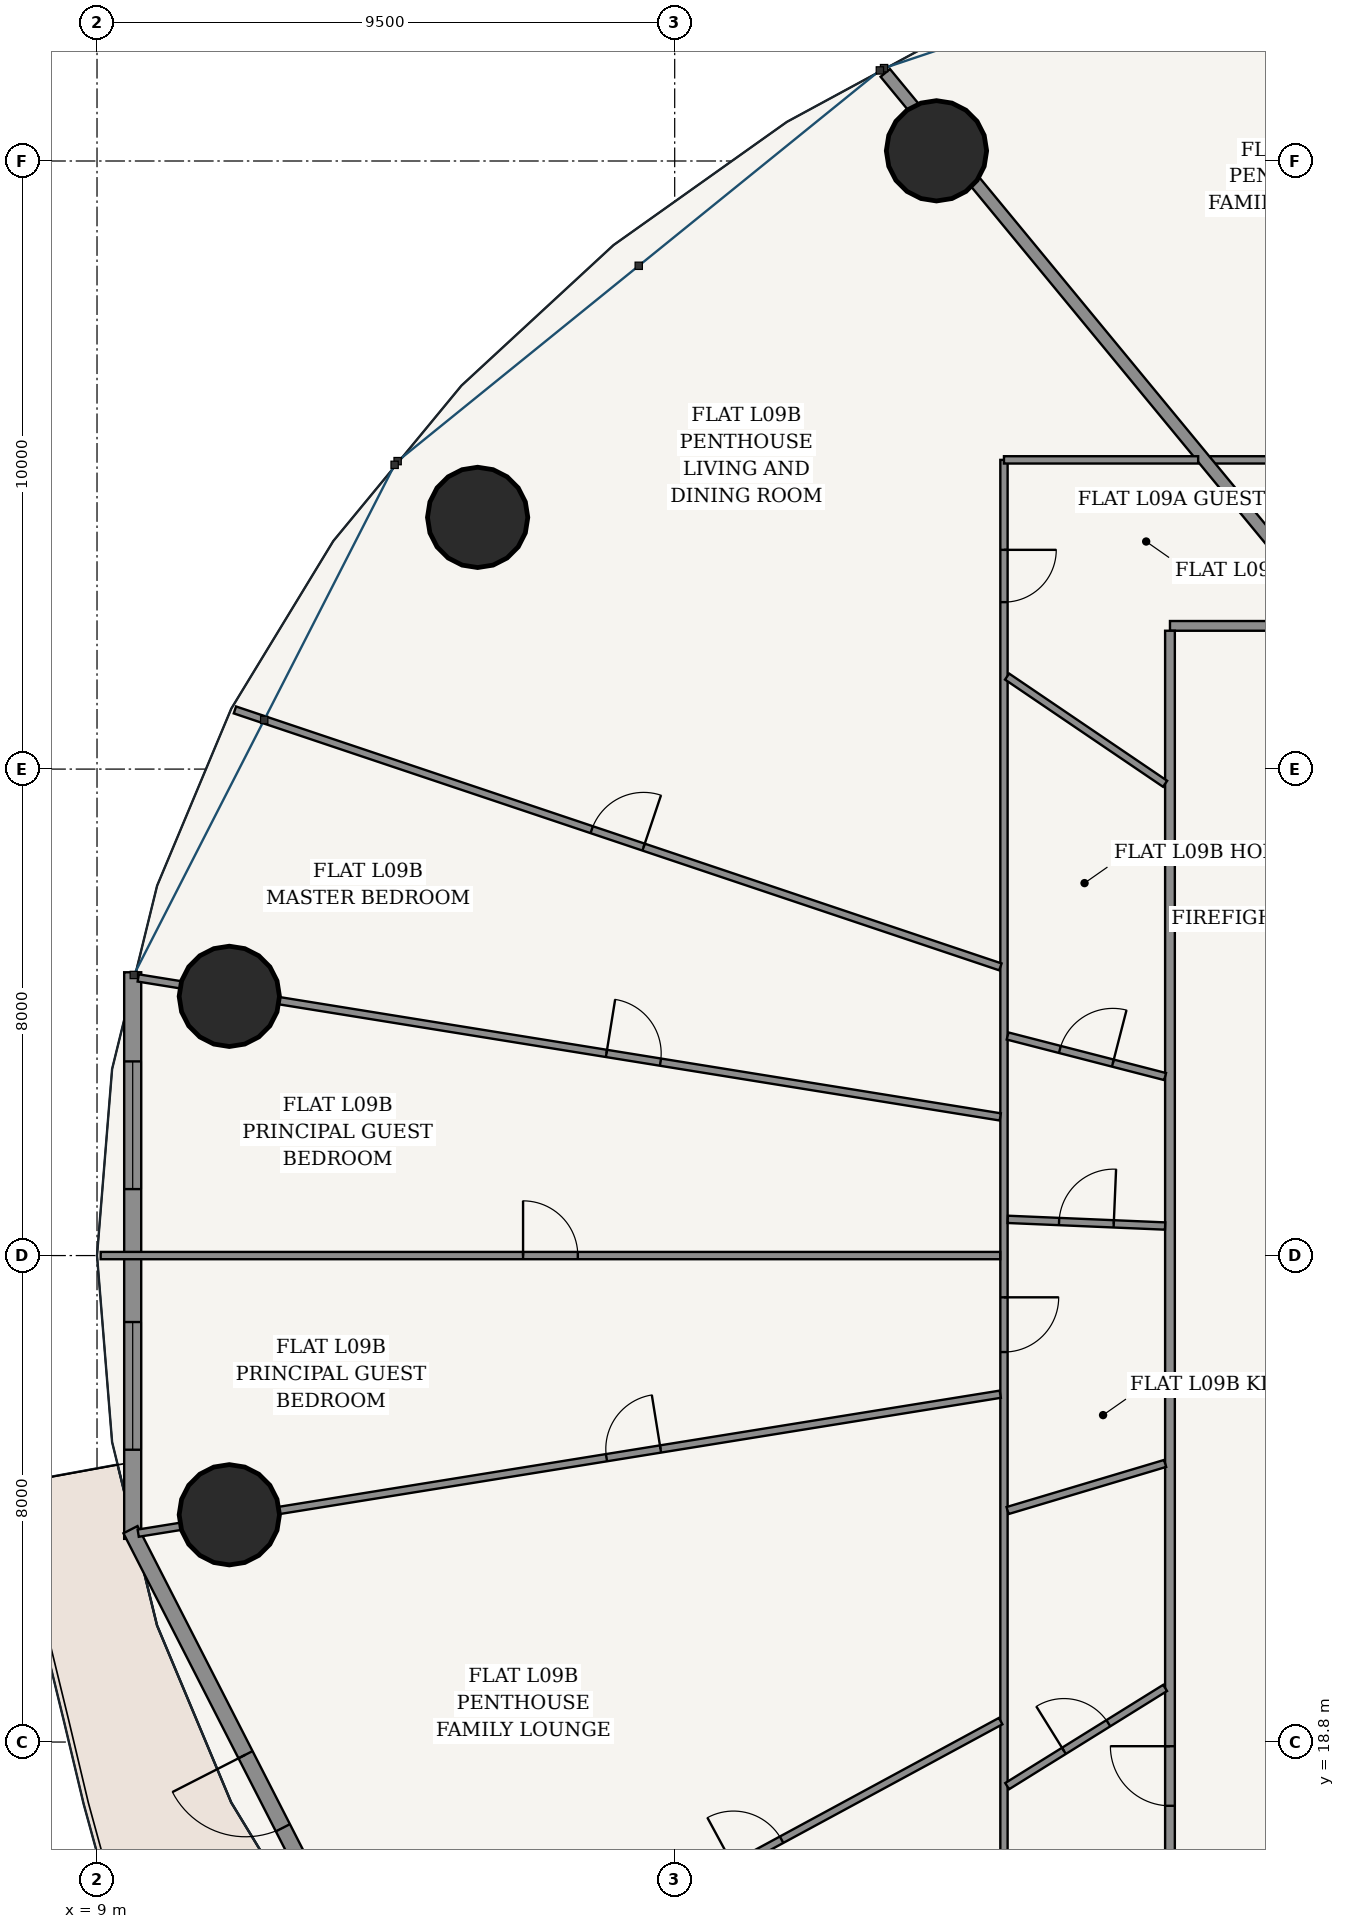
"""IFC4 building model, lengths in metres.
Left out: names, types, materials, properties, quantities, classifications, styles, units other than length and angle.
Written with IfcOpenShell. Run it as: python <this file> out.ifc"""

import sys

from ifc_helpers import new_model, si_unit, direction, frame, frame_2d, origin, origin_2d, place, context, subcontext, project, spatial, rectangle, hollow_circle, extrude, source, transform, mapped, element, fill, save


model = new_model("IFC4")
c1 = context("Model", 3, precision=1e-05, world=origin(), true_north=direction((-0.2419218956, 0.970295726276)))
c2 = subcontext(c1, "Body", "Model", "MODEL_VIEW")
j1 = project(units=[si_unit("LENGTHUNIT", "METRE"), si_unit("PLANEANGLEUNIT", "RADIAN")], contexts=[c1])
p1 = place(None, origin())
s1 = spatial("IfcSite", under=j1, at=p1, CompositionType="ELEMENT")
p2 = place(p1, origin())
s2 = spatial("IfcBuilding", under=s1, at=p2, CompositionType="ELEMENT")
p3 = place(p2, frame((0.0, 0.0, 38.4)))
s3 = spatial("IfcBuildingStorey", under=s2, at=p3, CompositionType="ELEMENT", Elevation=38.4)
for number, where, z_axis, x_axis in (
    (1, (22.805, 44.968, 0.0), (0.0, 0.0, 1.0), (1.0, 0.0, 0.0)),
    (2, (15.259, 38.939, 0.0), (0.0, 0.0, 1.0), (1.0, 0.0, 0.0)),
    (3, (11.176, 31.063, 0.0), (0.0, 0.0, 1.0), (1.0, 0.0, 0.0)),
    (4, (11.176, 22.537, 0.0), (0.0, 0.0, 1.0), (1.0, 0.0, 0.0)),
):
    element("IfcColumn", number, at=place(p3, frame(where, z_axis=z_axis, x_axis=x_axis)), inside=s3, PredefinedType="COLUMN", context=c2, shape_type="SweptSolid", body=[
        extrude(hollow_circle(Radius=0.825, WallThickness=0.05, at=origin_2d()), origin(), (0.0, 0.0, 1.0), 3.6),
    ])
p4 = place(p3, frame((9.587, 31.459, 0.0), z_axis=(0.0, 0.0, 1.0), x_axis=(0.0, -1.0, 0.0)))
e5 = element("IfcWall", 5, at=p4, inside=s3, PredefinedType="SOLIDWALL", context=c2, shape_type="SweptSolid", body=[
    extrude(rectangle(XDim=9.318, YDim=0.28, at=frame_2d((4.659, 0.0))), origin(), (0.0, 0.0, 1.0), 3.32),
])
p5 = place(p4, frame((1.466, 0.0, 0.85)))
e6 = element("IfcOpeningElement", 6, at=p5, cuts=e5, PredefinedType="OPENING", context=c2, shape_type="SweptSolid", body=[
    extrude(rectangle(XDim=2.1, YDim=1.95, at=frame_2d((1.05, 0.975))), frame((0.0, 0.15, 0.0), z_axis=(0.0, -1.0, 0.0), x_axis=(1.0, 0.0, 0.0)), (0.0, 0.0, 1.0), 0.3),
])
p6 = place(p4, frame((5.752, 0.0, 0.85)))
e7 = element("IfcOpeningElement", 7, at=p6, cuts=e5, PredefinedType="OPENING", context=c2, shape_type="SweptSolid", body=[
    extrude(rectangle(XDim=2.1, YDim=1.95, at=frame_2d((1.05, 0.975))), frame((0.0, 0.15, 0.0), z_axis=(0.0, -1.0, 0.0), x_axis=(1.0, 0.0, 0.0)), (0.0, 0.0, 1.0), 0.3),
])
p7 = place(p3, frame((9.55, 22.292, 0.0), z_axis=(0.0, 0.0, 1.0), x_axis=(0.455220575541, -0.890378698984, 0.0)))
e8 = element("IfcWall", 8, at=p7, inside=s3, PredefinedType="SOLIDWALL", context=c2, shape_type="SweptSolid", body=[
    extrude(rectangle(XDim=9.662, YDim=0.26, at=frame_2d((4.831, 0.0))), origin(), (0.0, 0.0, 1.0), 3.32),
])
p8 = place(p7, frame((4.156, 0.0, 0.0)))
e9 = element("IfcOpeningElement", 9, at=p8, cuts=e8, PredefinedType="OPENING", context=c2, shape_type="SweptSolid", body=[
    extrude(rectangle(XDim=1.35, YDim=2.2, at=frame_2d((0.675, 1.1))), frame((0.0, 0.14, 0.0), z_axis=(0.0, -1.0, 0.0), x_axis=(1.0, 0.0, 0.0)), (0.0, 0.0, 1.0), 0.28),
])
p9 = place(p3, frame((26.645, 37.155, 0.0), z_axis=(0.0, 0.0, 1.0), x_axis=(1.0, 0.0, 0.0)))
e10 = element("IfcWall", 10, at=p9, inside=s3, PredefinedType="PARTITIONING", context=c2, shape_type="SweptSolid", body=[
    extrude(rectangle(XDim=22.71, YDim=0.16, at=frame_2d((11.355, 0.0))), origin(), (0.0, 0.0, 1.0), 2.688),
])
p10 = place(p3, frame((26.645, 16.525, 0.0), z_axis=(0.0, 0.0, 1.0), x_axis=(0.0, 1.0, 0.0)))
e11 = element("IfcWall", 11, at=p10, inside=s3, PredefinedType="PARTITIONING", context=c2, shape_type="SweptSolid", body=[
    extrude(rectangle(XDim=20.55, YDim=0.16, at=frame_2d((10.275, 0.0))), origin(), (0.0, 0.0, 1.0), 2.688),
])
p11 = place(p10, frame((1.226, 0.0, 0.0)))
e12 = element("IfcOpeningElement", 12, at=p11, cuts=e11, PredefinedType="OPENING", context=c2, shape_type="SweptSolid", body=[
    extrude(rectangle(XDim=0.98, YDim=2.2, at=frame_2d((0.49, 1.1))), frame((0.0, 0.09, 0.0), z_axis=(0.0, -1.0, 0.0), x_axis=(1.0, 0.0, 0.0)), (0.0, 0.0, 1.0), 0.18),
])
p12 = place(p3, frame((27.312, 39.885, 0.0), z_axis=(0.0, 0.0, 1.0), x_axis=(1.0, 0.0, 0.0)))
e13 = element("IfcWall", 13, at=p12, inside=s3, PredefinedType="PARTITIONING", context=c2, shape_type="SweptSolid", body=[
    extrude(rectangle(XDim=24.772, YDim=0.12, at=frame_2d((12.386, 0.0))), origin(), (0.0, 0.0, 1.0), 2.688),
])
p13 = place(p3, frame((29.395, 37.237, 0.0), z_axis=(0.0, 0.0, 1.0), x_axis=(-0.636195770442, 0.77152766747, 0.0)))
e14 = element("IfcWall", 14, at=p13, inside=s3, PredefinedType="PARTITIONING", context=c2, shape_type="SweptSolid", body=[
    extrude(rectangle(XDim=11.681, YDim=0.2, at=frame_2d((5.84, 0.0))), origin(), (0.0, 0.0, 1.0), 2.688),
])
p14 = place(p3, frame((23.915, 13.715, 0.0), z_axis=(0.0, 0.0, 1.0), x_axis=(0.0, 1.0, 0.0)))
e15 = element("IfcWall", 15, at=p14, inside=s3, PredefinedType="PARTITIONING", context=c2, shape_type="SweptSolid", body=[
    extrude(rectangle(XDim=26.17, YDim=0.12, at=frame_2d((13.085, 0.0))), origin(), (0.0, 0.0, 1.0), 2.688),
])
p15 = place(p14, frame((1.895, 0.0, 0.0)))
e16 = element("IfcOpeningElement", 16, at=p15, cuts=e15, PredefinedType="OPENING", context=c2, shape_type="SweptSolid", body=[
    extrude(rectangle(XDim=0.9, YDim=2.15, at=frame_2d((0.45, 1.075))), frame((0.0, 0.07, 0.0), z_axis=(0.0, -1.0, 0.0), x_axis=(1.0, 0.0, 0.0)), (0.0, 0.0, 1.0), 0.14),
])
p16 = place(p14, frame((11.498, 0.0, 0.0)))
e17 = element("IfcOpeningElement", 17, at=p16, cuts=e15, PredefinedType="OPENING", context=c2, shape_type="SweptSolid", body=[
    extrude(rectangle(XDim=0.9, YDim=2.15, at=frame_2d((0.45, 1.075))), frame((0.0, 0.07, 0.0), z_axis=(0.0, -1.0, 0.0), x_axis=(1.0, 0.0, 0.0)), (0.0, 0.0, 1.0), 0.14),
])
p17 = place(p14, frame((23.831, 0.0, 0.0)))
e18 = element("IfcOpeningElement", 18, at=p17, cuts=e15, PredefinedType="OPENING", context=c2, shape_type="SweptSolid", body=[
    extrude(rectangle(XDim=0.86, YDim=2.15, at=frame_2d((0.43, 1.075))), frame((0.0, 0.07, 0.0), z_axis=(0.0, -1.0, 0.0), x_axis=(1.0, 0.0, 0.0)), (0.0, 0.0, 1.0), 0.14),
])
p18 = place(p3, frame((23.915, 39.885, 0.0), z_axis=(0.0, 0.0, 1.0), x_axis=(1.0, 0.0, 0.0)))
e19 = element("IfcWall", 19, at=p18, inside=s3, PredefinedType="PARTITIONING", context=c2, shape_type="SweptSolid", body=[
    extrude(rectangle(XDim=3.194, YDim=0.12, at=frame_2d((1.597, 0.0))), origin(), (0.0, 0.0, 1.0), 2.688),
])
p19 = place(p3, frame((23.856, 31.547, 0.0), z_axis=(0.0, 0.0, 1.0), x_axis=(-0.948017487737, 0.318218231634, 0.0)))
e20 = element("IfcWall", 20, at=p19, inside=s3, PredefinedType="PARTITIONING", context=c2, shape_type="SweptSolid", body=[
    extrude(rectangle(XDim=13.279, YDim=0.12, at=frame_2d((6.639, 0.0))), origin(), (0.0, 0.0, 1.0), 2.762),
])
p20 = place(p19, frame((6.189, 0.0, 0.0)))
e21 = element("IfcOpeningElement", 21, at=p20, cuts=e20, PredefinedType="OPENING", context=c2, shape_type="SweptSolid", body=[
    extrude(rectangle(XDim=0.9, YDim=2.15, at=frame_2d((0.45, 1.075))), frame((0.0, 0.07, 0.0), z_axis=(0.0, -1.0, 0.0), x_axis=(1.0, 0.0, 0.0)), (0.0, 0.0, 1.0), 0.14),
])
p21 = place(p3, frame((23.854, 29.08, 0.0), z_axis=(0.0, 0.0, 1.0), x_axis=(-0.987255773689, 0.159141563768, 0.0)))
e22 = element("IfcWall", 22, at=p21, inside=s3, PredefinedType="PARTITIONING", context=c2, shape_type="SweptSolid", body=[
    extrude(rectangle(XDim=14.359, YDim=0.12, at=frame_2d((7.18, 0.0))), origin(), (0.0, 0.0, 1.0), 2.688),
])
p22 = place(p21, frame((5.66, 0.0, 0.0)))
e23 = element("IfcOpeningElement", 23, at=p22, cuts=e22, PredefinedType="OPENING", context=c2, shape_type="SweptSolid", body=[
    extrude(rectangle(XDim=0.9, YDim=2.15, at=frame_2d((0.45, 1.075))), frame((0.0, 0.07, 0.0), z_axis=(0.0, -1.0, 0.0), x_axis=(1.0, 0.0, 0.0)), (0.0, 0.0, 1.0), 0.14),
])
p23 = place(p3, frame((23.853, 26.8, 0.0), z_axis=(0.0, 0.0, 1.0), x_axis=(-1.0, 0.0, 0.0)))
e24 = element("IfcWall", 24, at=p23, inside=s3, PredefinedType="PARTITIONING", context=c2, shape_type="SweptSolid", body=[
    extrude(rectangle(XDim=14.793, YDim=0.12, at=frame_2d((7.396, 0.0))), origin(), (0.0, 0.0, 1.0), 2.762),
])
p24 = place(p23, frame((6.947, 0.0, 0.0)))
e25 = element("IfcOpeningElement", 25, at=p24, cuts=e24, PredefinedType="OPENING", context=c2, shape_type="SweptSolid", body=[
    extrude(rectangle(XDim=0.9, YDim=2.15, at=frame_2d((0.45, 1.075))), frame((0.0, 0.07, 0.0), z_axis=(0.0, -1.0, 0.0), x_axis=(1.0, 0.0, 0.0)), (0.0, 0.0, 1.0), 0.14),
])
p25 = place(p3, frame((23.854, 24.52, 0.0), z_axis=(0.0, 0.0, 1.0), x_axis=(-0.987258444847, -0.159124991997, 0.0)))
e26 = element("IfcWall", 26, at=p25, inside=s3, PredefinedType="PARTITIONING", context=c2, shape_type="SweptSolid", body=[
    extrude(rectangle(XDim=14.359, YDim=0.12, at=frame_2d((7.18, 0.0))), origin(), (0.0, 0.0, 1.0), 2.688),
])
p26 = place(p25, frame((5.659, 0.0, 0.0)))
e27 = element("IfcOpeningElement", 27, at=p26, cuts=e26, PredefinedType="OPENING", context=c2, shape_type="SweptSolid", body=[
    extrude(rectangle(XDim=0.9, YDim=2.15, at=frame_2d((0.45, 1.075))), frame((0.0, 0.07, 0.0), z_axis=(0.0, -1.0, 0.0), x_axis=(1.0, 0.0, 0.0)), (0.0, 0.0, 1.0), 0.14),
])
p27 = place(p3, frame((23.861, 19.144, 0.0), z_axis=(0.0, 0.0, 1.0), x_axis=(-0.879372452045, -0.476134529922, 0.0)))
e28 = element("IfcWall", 28, at=p27, inside=s3, PredefinedType="PARTITIONING", context=c2, shape_type="SweptSolid", body=[
    extrude(rectangle(XDim=11.219, YDim=0.12, at=frame_2d((5.61, 0.0))), origin(), (0.0, 0.0, 1.0), 2.688),
])
p28 = place(p27, frame((4.097, 0.0, 0.0)))
e29 = element("IfcOpeningElement", 29, at=p28, cuts=e28, PredefinedType="OPENING", context=c2, shape_type="SweptSolid", body=[
    extrude(rectangle(XDim=0.9, YDim=2.15, at=frame_2d((0.45, 1.075))), frame((0.0, 0.07, 0.0), z_axis=(0.0, -1.0, 0.0), x_axis=(1.0, 0.0, 0.0)), (0.0, 0.0, 1.0), 0.14),
])
p29 = place(p3, frame((26.565, 34.558, 0.0), z_axis=(0.0, 0.0, 1.0), x_axis=(-0.827501574847, 0.561463394734, 0.0)))
e30 = element("IfcWall", 30, at=p29, inside=s3, PredefinedType="PARTITIONING", context=c2, shape_type="SweptSolid", body=[
    extrude(rectangle(XDim=3.14, YDim=0.12, at=frame_2d((1.57, 0.0))), origin(), (0.0, 0.0, 1.0), 3.32),
])
p30 = place(p3, frame((26.565, 29.744, 0.0), z_axis=(0.0, 0.0, 1.0), x_axis=(-0.968421803088, 0.249317490972, 0.0)))
e31 = element("IfcWall", 31, at=p30, inside=s3, PredefinedType="PARTITIONING", context=c2, shape_type="SweptSolid", body=[
    extrude(rectangle(XDim=2.674, YDim=0.12, at=frame_2d((1.337, 0.0))), origin(), (0.0, 0.0, 1.0), 3.32),
])
p31 = place(p30, frame((0.887, 0.0, 0.0)))
e32 = element("IfcOpeningElement", 32, at=p31, cuts=e31, PredefinedType="OPENING", context=c2, shape_type="SweptSolid", body=[
    extrude(rectangle(XDim=0.9, YDim=2.15, at=frame_2d((0.45, 1.075))), frame((0.0, 0.07, 0.0), z_axis=(0.0, -1.0, 0.0), x_axis=(1.0, 0.0, 0.0)), (0.0, 0.0, 1.0), 0.14),
])
p32 = place(p3, frame((26.565, 27.286, 0.0), z_axis=(0.0, 0.0, 1.0), x_axis=(-0.999100094808, 0.042414626666, 0.0)))
e33 = element("IfcWall", 33, at=p32, inside=s3, PredefinedType="PARTITIONING", context=c2, shape_type="SweptSolid", body=[
    extrude(rectangle(XDim=2.59, YDim=0.12, at=frame_2d((1.295, 0.0))), origin(), (0.0, 0.0, 1.0), 3.32),
])
p33 = place(p32, frame((0.845, 0.0, 0.0)))
e34 = element("IfcOpeningElement", 34, at=p33, cuts=e33, PredefinedType="OPENING", context=c2, shape_type="SweptSolid", body=[
    extrude(rectangle(XDim=0.9, YDim=2.15, at=frame_2d((0.45, 1.075))), frame((0.0, 0.07, 0.0), z_axis=(0.0, -1.0, 0.0), x_axis=(1.0, 0.0, 0.0)), (0.0, 0.0, 1.0), 0.14),
])
p34 = place(p3, frame((26.565, 23.382, 0.0), z_axis=(0.0, 0.0, 1.0), x_axis=(-0.958081868855, -0.286494559408, 0.0)))
e35 = element("IfcWall", 35, at=p34, inside=s3, PredefinedType="PARTITIONING", context=c2, shape_type="SweptSolid", body=[
    extrude(rectangle(XDim=2.704, YDim=0.12, at=frame_2d((1.352, 0.0))), origin(), (0.0, 0.0, 1.0), 3.32),
])
p35 = place(p3, frame((26.565, 19.69, 0.0), z_axis=(0.0, 0.0, 1.0), x_axis=(-0.849229217796, -0.52802437031, 0.0)))
e36 = element("IfcWall", 36, at=p35, inside=s3, PredefinedType="PARTITIONING", context=c2, shape_type="SweptSolid", body=[
    extrude(rectangle(XDim=3.059, YDim=0.12, at=frame_2d((1.529, 0.0))), origin(), (0.0, 0.0, 1.0), 3.32),
])
p36 = place(p35, frame((1.099, 0.0, 0.0)))
e37 = element("IfcOpeningElement", 37, at=p36, cuts=e36, PredefinedType="OPENING", context=c2, shape_type="SweptSolid", body=[
    extrude(rectangle(XDim=0.86, YDim=2.15, at=frame_2d((0.43, 1.075))), frame((0.0, 0.07, 0.0), z_axis=(0.0, -1.0, 0.0), x_axis=(1.0, 0.0, 0.0)), (0.0, 0.0, 1.0), 0.14),
])
m1 = source(origin(), c2, "Body", "SweptSolid", [
    extrude(rectangle(XDim=2.1, YDim=1.95, at=frame_2d((1.05, 0.975))), frame((0.0, 0.03, 0.0), z_axis=(0.0, -1.0, 0.0), x_axis=(1.0, 0.0, 0.0)), (0.0, 0.0, 1.0), 0.06),
])
p37 = place(p5, origin())
e38 = element("IfcWindow", 38, at=p37, inside=s3, PartitioningType="SINGLE_PANEL", PredefinedType="WINDOW", context=c2, shape_type="MappedRepresentation", body=[
    mapped(m1, transform((0.0, 0.0, 0.0), scale=1.0)),
])
fill(e6, e38)
p38 = place(p6, origin())
e39 = element("IfcWindow", 39, at=p38, inside=s3, PartitioningType="SINGLE_PANEL", PredefinedType="WINDOW", context=c2, shape_type="MappedRepresentation", body=[
    mapped(m1, transform((0.0, 0.0, 0.0), scale=1.0)),
])
fill(e7, e39)
m2 = source(origin(), c2, "Body", "SweptSolid", [
    extrude(rectangle(XDim=1.35, YDim=2.2, at=frame_2d((0.675, 1.1))), frame((0.0, 0.025, 0.0), z_axis=(0.0, -1.0, 0.0), x_axis=(1.0, 0.0, 0.0)), (0.0, 0.0, 1.0), 0.05),
])
p39 = place(p8, frame((1.35, 0.0, 0.0), z_axis=(0.0, 0.0, 1.0), x_axis=(-1.0, 0.0, 0.0)))
e40 = element("IfcDoor", 40, at=p39, inside=s3, OperationType="SINGLE_SWING_RIGHT", PredefinedType="DOOR", context=c2, shape_type="MappedRepresentation", body=[
    mapped(m2, transform((0.0, 0.0, 0.0), scale=1.0)),
])
fill(e9, e40)
m3 = source(origin(), c2, "Body", "SweptSolid", [
    extrude(rectangle(XDim=0.98, YDim=2.2, at=frame_2d((0.49, 1.1))), frame((0.0, 0.025, 0.0), z_axis=(0.0, -1.0, 0.0), x_axis=(1.0, 0.0, 0.0)), (0.0, 0.0, 1.0), 0.05),
])
p40 = place(p11, origin())
e41 = element("IfcDoor", 41, at=p40, inside=s3, OperationType="SINGLE_SWING_RIGHT", PredefinedType="DOOR", context=c2, shape_type="MappedRepresentation", body=[
    mapped(m3, transform((0.0, 0.0, 0.0), scale=1.0)),
])
fill(e12, e41)
m4 = source(origin(), c2, "Body", "SweptSolid", [
    extrude(rectangle(XDim=0.86, YDim=2.15, at=frame_2d((0.43, 1.075))), frame((0.0, 0.025, 0.0), z_axis=(0.0, -1.0, 0.0), x_axis=(1.0, 0.0, 0.0)), (0.0, 0.0, 1.0), 0.05),
])
p41 = place(p36, frame((0.86, 0.0, 0.0), z_axis=(0.0, 0.0, 1.0), x_axis=(-1.0, 0.0, 0.0)))
e42 = element("IfcDoor", 42, at=p41, inside=s3, OperationType="SINGLE_SWING_LEFT", PredefinedType="DOOR", context=c2, shape_type="MappedRepresentation", body=[
    mapped(m4, transform((0.0, 0.0, 0.0), scale=1.0)),
])
fill(e37, e42)
m5 = source(origin(), c2, "Body", "SweptSolid", [
    extrude(rectangle(XDim=0.9, YDim=2.15, at=frame_2d((0.45, 1.075))), frame((0.0, 0.025, 0.0), z_axis=(0.0, -1.0, 0.0), x_axis=(1.0, 0.0, 0.0)), (0.0, 0.0, 1.0), 0.05),
])
p42 = place(p28, frame((0.9, 0.0, 0.0), z_axis=(0.0, 0.0, 1.0), x_axis=(-1.0, 0.0, 0.0)))
e43 = element("IfcDoor", 43, at=p42, inside=s3, OperationType="SINGLE_SWING_LEFT", PredefinedType="DOOR", context=c2, shape_type="MappedRepresentation", body=[
    mapped(m5, transform((0.0, 0.0, 0.0), scale=1.0)),
])
fill(e29, e43)
p43 = place(p26, frame((0.9, 0.0, 0.0), z_axis=(0.0, 0.0, 1.0), x_axis=(-1.0, 0.0, 0.0)))
e44 = element("IfcDoor", 44, at=p43, inside=s3, OperationType="SINGLE_SWING_RIGHT", PredefinedType="DOOR", context=c2, shape_type="MappedRepresentation", body=[
    mapped(m5, transform((0.0, 0.0, 0.0), scale=1.0)),
])
fill(e27, e44)
p44 = place(p16, frame((0.9, 0.0, 0.0), z_axis=(0.0, 0.0, 1.0), x_axis=(-1.0, 0.0, 0.0)))
e45 = element("IfcDoor", 45, at=p44, inside=s3, OperationType="SINGLE_SWING_LEFT", PredefinedType="DOOR", context=c2, shape_type="MappedRepresentation", body=[
    mapped(m5, transform((0.0, 0.0, 0.0), scale=1.0)),
])
fill(e17, e45)
p45 = place(p33, frame((0.9, 0.0, 0.0), z_axis=(0.0, 0.0, 1.0), x_axis=(-1.0, 0.0, 0.0)))
e46 = element("IfcDoor", 46, at=p45, inside=s3, OperationType="SINGLE_SWING_RIGHT", PredefinedType="DOOR", context=c2, shape_type="MappedRepresentation", body=[
    mapped(m5, transform((0.0, 0.0, 0.0), scale=1.0)),
])
fill(e34, e46)
p46 = place(p24, frame((0.9, 0.0, 0.0), z_axis=(0.0, 0.0, 1.0), x_axis=(-1.0, 0.0, 0.0)))
e47 = element("IfcDoor", 47, at=p46, inside=s3, OperationType="SINGLE_SWING_LEFT", PredefinedType="DOOR", context=c2, shape_type="MappedRepresentation", body=[
    mapped(m5, transform((0.0, 0.0, 0.0), scale=1.0)),
])
fill(e25, e47)
p47 = place(p31, frame((0.9, 0.0, 0.0), z_axis=(0.0, 0.0, 1.0), x_axis=(-1.0, 0.0, 0.0)))
e48 = element("IfcDoor", 48, at=p47, inside=s3, OperationType="SINGLE_SWING_RIGHT", PredefinedType="DOOR", context=c2, shape_type="MappedRepresentation", body=[
    mapped(m5, transform((0.0, 0.0, 0.0), scale=1.0)),
])
fill(e32, e48)
p48 = place(p22, frame((0.9, 0.0, 0.0), z_axis=(0.0, 0.0, 1.0), x_axis=(-1.0, 0.0, 0.0)))
e49 = element("IfcDoor", 49, at=p48, inside=s3, OperationType="SINGLE_SWING_LEFT", PredefinedType="DOOR", context=c2, shape_type="MappedRepresentation", body=[
    mapped(m5, transform((0.0, 0.0, 0.0), scale=1.0)),
])
fill(e23, e49)
p49 = place(p20, frame((0.9, 0.0, 0.0), z_axis=(0.0, 0.0, 1.0), x_axis=(-1.0, 0.0, 0.0)))
e50 = element("IfcDoor", 50, at=p49, inside=s3, OperationType="SINGLE_SWING_RIGHT", PredefinedType="DOOR", context=c2, shape_type="MappedRepresentation", body=[
    mapped(m5, transform((0.0, 0.0, 0.0), scale=1.0)),
])
fill(e21, e50)
p50 = place(p17, frame((0.86, 0.0, 0.0), z_axis=(0.0, 0.0, 1.0), x_axis=(-1.0, 0.0, 0.0)))
e51 = element("IfcDoor", 51, at=p50, inside=s3, OperationType="SINGLE_SWING_LEFT", PredefinedType="DOOR", context=c2, shape_type="MappedRepresentation", body=[
    mapped(m4, transform((0.0, 0.0, 0.0), scale=1.0)),
])
fill(e18, e51)
save(model, sys.argv[1])
